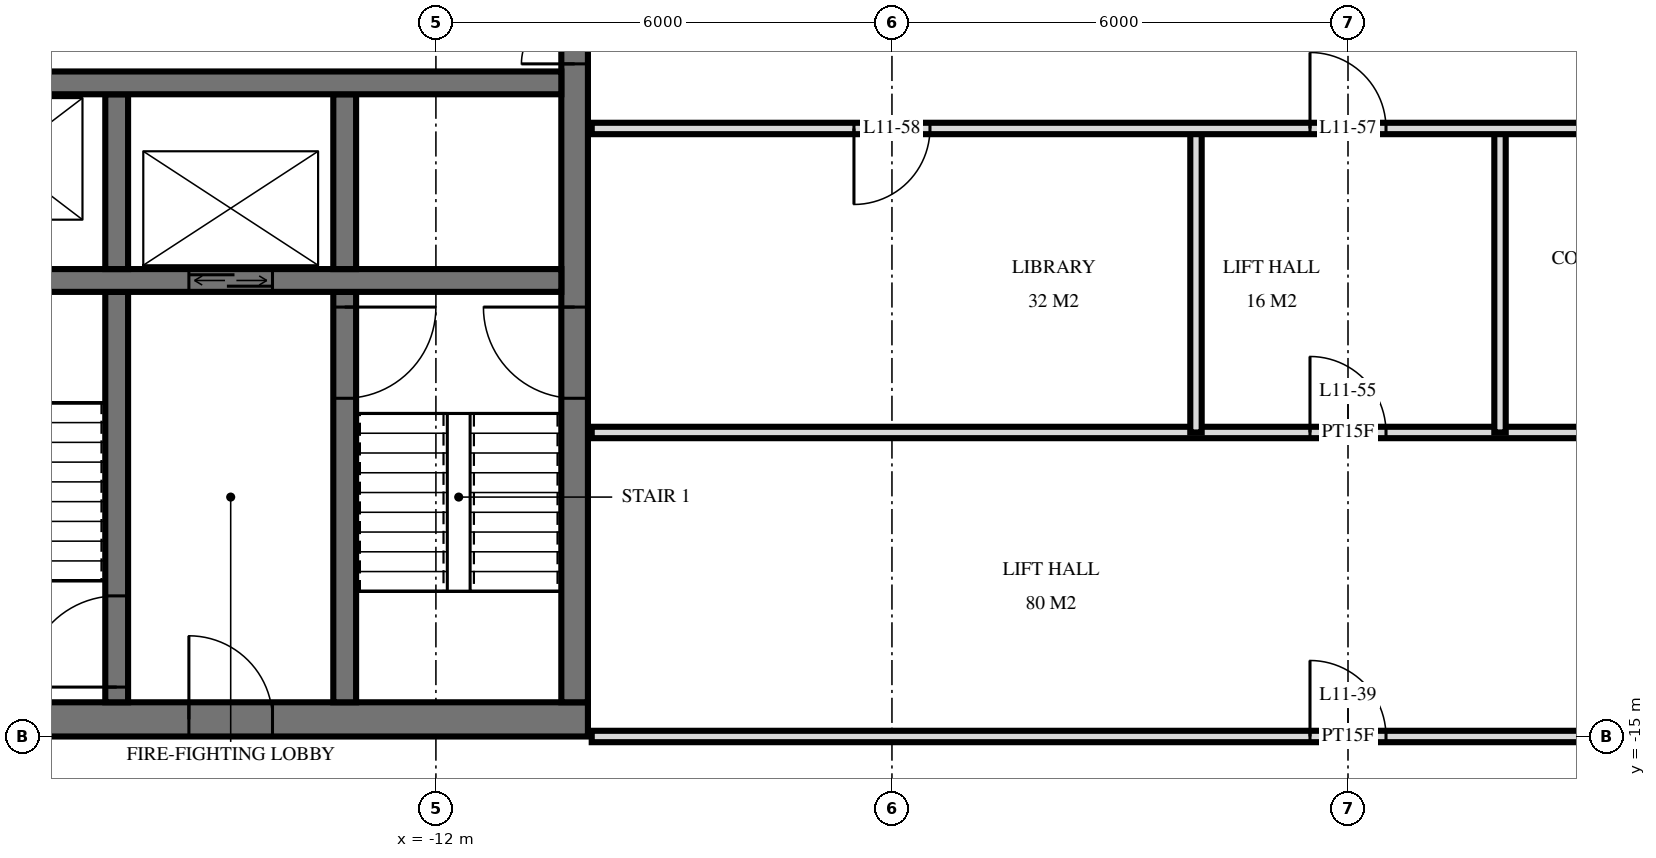
"""IFC4 building model, lengths in metres.
Left out: names, types, materials, properties, quantities, classifications, styles, units other than length and angle.
Written with IfcOpenShell. Run it as: python <this file> out.ifc"""

import sys

from ifc_helpers import new_model, si_unit, direction, frame, frame_2d, origin, place, context, subcontext, project, spatial, rectangle, extrude, element, fill, save


model = new_model("IFC4")
c1 = context("Model", 3, precision=1e-05, world=origin(), true_north=direction((0.0, 1.0)))
c2 = subcontext(c1, "Body", "Model", "MODEL_VIEW")
j1 = project(units=[si_unit("LENGTHUNIT", "METRE"), si_unit("PLANEANGLEUNIT", "RADIAN")], contexts=[c1])
p1 = place(None, origin())
s1 = spatial("IfcSite", under=j1, at=p1, CompositionType="ELEMENT")
p2 = place(p1, origin())
s2 = spatial("IfcBuilding", under=s1, at=p2, CompositionType="ELEMENT")
p3 = place(p2, frame((0.0, 0.0, 49.2)))
s3 = spatial("IfcBuildingStorey", under=s2, at=p3, CompositionType="ELEMENT", Elevation=49.2)
p4 = place(p3, frame((-29.5, -14.775, 0.0), z_axis=(0.0, 0.0, 1.0), x_axis=(1.0, 0.0, 0.0)))
e1 = element("IfcWall", 1, at=p4, inside=s3, PredefinedType="SHEAR", context=c2, shape_type="SweptSolid", body=[
    extrude(rectangle(XDim=19.5, YDim=0.45, at=frame_2d((9.75, 0.0))), origin(), (0.0, 0.0, 1.0), 3.6),
])
p5 = place(p4, frame((11.2, 0.0, 0.0)))
e2 = element("IfcOpeningElement", 2, at=p5, cuts=e1, PredefinedType="OPENING", context=c2, shape_type="SweptSolid", body=[
    extrude(rectangle(XDim=1.2, YDim=2.1, at=frame_2d((0.6, 1.05))), frame((0.0, 0.235, 0.0), z_axis=(0.0, -1.0, 0.0), x_axis=(1.0, 0.0, 0.0)), (0.0, 0.0, 1.0), 0.47),
])
p6 = place(p4, frame((14.25, 0.0, 0.0)))
e3 = element("IfcOpeningElement", 3, at=p6, cuts=e1, PredefinedType="OPENING", context=c2, shape_type="SweptSolid", body=[
    extrude(rectangle(XDim=1.1, YDim=2.1, at=frame_2d((0.55, 1.05))), frame((0.0, 0.235, 0.0), z_axis=(0.0, -1.0, 0.0), x_axis=(1.0, 0.0, 0.0)), (0.0, 0.0, 1.0), 0.47),
])
p7 = place(p4, frame((8.5, 0.0, 0.0)))
e4 = element("IfcOpeningElement", 4, at=p7, cuts=e1, PredefinedType="OPENING", context=c2, shape_type="SweptSolid", body=[
    extrude(rectangle(XDim=0.9, YDim=2.1, at=frame_2d((0.45, 1.05))), frame((0.0, 0.235, 0.0), z_axis=(0.0, -1.0, 0.0), x_axis=(1.0, 0.0, 0.0)), (0.0, 0.0, 1.0), 0.47),
])
p8 = place(p4, frame((6.05, 0.0, 0.0)))
e5 = element("IfcOpeningElement", 5, at=p8, cuts=e1, PredefinedType="OPENING", context=c2, shape_type="SweptSolid", body=[
    extrude(rectangle(XDim=1.0, YDim=2.1, at=frame_2d((0.5, 1.05))), frame((0.0, 0.235, 0.0), z_axis=(0.0, -1.0, 0.0), x_axis=(1.0, 0.0, 0.0)), (0.0, 0.0, 1.0), 0.47),
])
p9 = place(p4, frame((3.587, 0.0, 0.0)))
e6 = element("IfcOpeningElement", 6, at=p9, cuts=e1, PredefinedType="OPENING", context=c2, shape_type="SweptSolid", body=[
    extrude(rectangle(XDim=1.0, YDim=2.1, at=frame_2d((0.5, 1.05))), frame((0.0, 0.235, 0.0), z_axis=(0.0, -1.0, 0.0), x_axis=(1.0, 0.0, 0.0)), (0.0, 0.0, 1.0), 0.47),
])
p10 = place(p4, frame((1.85, 0.0, 0.0)))
e7 = element("IfcOpeningElement", 7, at=p10, cuts=e1, PredefinedType="OPENING", context=c2, shape_type="SweptSolid", body=[
    extrude(rectangle(XDim=1.0, YDim=2.1, at=frame_2d((0.5, 1.05))), frame((0.0, 0.235, 0.0), z_axis=(0.0, -1.0, 0.0), x_axis=(1.0, 0.0, 0.0)), (0.0, 0.0, 1.0), 0.47),
])
p11 = place(p4, frame((0.55, 0.0, 0.0)))
e8 = element("IfcOpeningElement", 8, at=p11, cuts=e1, PredefinedType="OPENING", context=c2, shape_type="SweptSolid", body=[
    extrude(rectangle(XDim=1.0, YDim=2.1, at=frame_2d((0.5, 1.05))), frame((0.0, 0.235, 0.0), z_axis=(0.0, -1.0, 0.0), x_axis=(1.0, 0.0, 0.0)), (0.0, 0.0, 1.0), 0.47),
])
p12 = place(p3, frame((-10.175, -14.55, 0.0), z_axis=(0.0, 0.0, 1.0), x_axis=(0.0, 1.0, 0.0)))
e9 = element("IfcWall", 9, at=p12, inside=s3, PredefinedType="SHEAR", context=c2, shape_type="SweptSolid", body=[
    extrude(rectangle(XDim=14.1, YDim=0.35, at=frame_2d((7.05, 0.0))), origin(), (0.0, 0.0, 1.0), 3.6),
])
p13 = place(p12, frame((8.4, 0.0, 0.0)))
e10 = element("IfcOpeningElement", 10, at=p13, cuts=e9, PredefinedType="OPENING", context=c2, shape_type="SweptSolid", body=[
    extrude(rectangle(XDim=1.4, YDim=2.4, at=frame_2d((0.7, 1.2))), frame((0.0, 0.185, 0.0), z_axis=(0.0, -1.0, 0.0), x_axis=(1.0, 0.0, 0.0)), (0.0, 0.0, 1.0), 0.37),
])
p14 = place(p12, frame((10.0, 0.0, 0.0)))
e11 = element("IfcOpeningElement", 11, at=p14, cuts=e9, PredefinedType="OPENING", context=c2, shape_type="SweptSolid", body=[
    extrude(rectangle(XDim=1.4, YDim=2.4, at=frame_2d((0.7, 1.2))), frame((0.0, 0.185, 0.0), z_axis=(0.0, -1.0, 0.0), x_axis=(1.0, 0.0, 0.0)), (0.0, 0.0, 1.0), 0.37),
])
p15 = place(p12, frame((4.0, 0.0, 0.0)))
e12 = element("IfcOpeningElement", 12, at=p15, cuts=e9, PredefinedType="OPENING", context=c2, shape_type="SweptSolid", body=[
    extrude(rectangle(XDim=1.2, YDim=2.1, at=frame_2d((0.6, 1.05))), frame((0.0, 0.185, 0.0), z_axis=(0.0, -1.0, 0.0), x_axis=(1.0, 0.0, 0.0)), (0.0, 0.0, 1.0), 0.37),
])
p16 = place(p3, frame((-29.05, -6.4, 0.0), z_axis=(0.0, 0.0, 1.0), x_axis=(1.0, 0.0, 0.0)))
e13 = element("IfcWall", 13, at=p16, inside=s3, PredefinedType="SHEAR", context=c2, shape_type="SweptSolid", body=[
    extrude(rectangle(XDim=18.7, YDim=0.3, at=frame_2d((9.35, 0.0))), origin(), (0.0, 0.0, 1.0), 3.6),
])
p17 = place(p16, frame((2.95, 0.0, 0.0)))
e14 = element("IfcOpeningElement", 14, at=p17, cuts=e13, PredefinedType="OPENING", context=c2, shape_type="SweptSolid", body=[
    extrude(rectangle(XDim=1.1, YDim=2.1, at=frame_2d((0.55, 1.05))), frame((0.0, 0.16, 0.0), z_axis=(0.0, -1.0, 0.0), x_axis=(1.0, 0.0, 0.0)), (0.0, 0.0, 1.0), 0.32),
])
p18 = place(p16, frame((0.55, 0.0, 0.0)))
e15 = element("IfcOpeningElement", 15, at=p18, cuts=e13, PredefinedType="OPENING", context=c2, shape_type="SweptSolid", body=[
    extrude(rectangle(XDim=1.1, YDim=2.1, at=frame_2d((0.55, 1.05))), frame((0.0, 0.16, 0.0), z_axis=(0.0, -1.0, 0.0), x_axis=(1.0, 0.0, 0.0)), (0.0, 0.0, 1.0), 0.32),
])
p19 = place(p16, frame((10.8, 0.0, 0.0)))
e16 = element("IfcOpeningElement", 16, at=p19, cuts=e13, PredefinedType="OPENING", context=c2, shape_type="SweptSolid", body=[
    extrude(rectangle(XDim=1.1, YDim=2.1, at=frame_2d((0.55, 1.05))), frame((0.0, 0.16, 0.0), z_axis=(0.0, -1.0, 0.0), x_axis=(1.0, 0.0, 0.0)), (0.0, 0.0, 1.0), 0.32),
])
p20 = place(p16, frame((5.6, 0.0, 0.0)))
e17 = element("IfcOpeningElement", 17, at=p20, cuts=e13, PredefinedType="OPENING", context=c2, shape_type="SweptSolid", body=[
    extrude(rectangle(XDim=1.0, YDim=2.1, at=frame_2d((0.5, 1.05))), frame((0.0, 0.16, 0.0), z_axis=(0.0, -1.0, 0.0), x_axis=(1.0, 0.0, 0.0)), (0.0, 0.0, 1.0), 0.32),
])
p21 = place(p3, frame((-29.05, -9.0, 0.0), z_axis=(0.0, 0.0, 1.0), x_axis=(1.0, 0.0, 0.0)))
e18 = element("IfcWall", 18, at=p21, inside=s3, PredefinedType="SHEAR", context=c2, shape_type="SweptSolid", body=[
    extrude(rectangle(XDim=18.7, YDim=0.3, at=frame_2d((9.35, 0.0))), origin(), (0.0, 0.0, 1.0), 3.6),
])
p22 = place(p21, frame((13.8, 0.0, 0.0)))
e19 = element("IfcOpeningElement", 19, at=p22, cuts=e18, PredefinedType="OPENING", context=c2, shape_type="SweptSolid", body=[
    extrude(rectangle(XDim=1.1, YDim=2.1, at=frame_2d((0.55, 1.05))), frame((0.0, 0.16, 0.0), z_axis=(0.0, -1.0, 0.0), x_axis=(1.0, 0.0, 0.0)), (0.0, 0.0, 1.0), 0.32),
])
p23 = place(p3, frame((-13.2, -8.85, 0.0), z_axis=(0.0, 0.0, 1.0), x_axis=(0.0, 1.0, 0.0)))
e20 = element("IfcWall", 20, at=p23, inside=s3, PredefinedType="SHEAR", context=c2, shape_type="SweptSolid", body=[
    extrude(rectangle(XDim=2.3, YDim=0.3, at=frame_2d((1.15, 0.0))), origin(), (0.0, 0.0, 1.0), 3.6),
])
p24 = place(p3, frame((-13.2, -14.55, 0.0), z_axis=(0.0, 0.0, 1.0), x_axis=(0.0, 1.0, 0.0)))
e21 = element("IfcWall", 21, at=p24, inside=s3, PredefinedType="SHEAR", context=c2, shape_type="SweptSolid", body=[
    extrude(rectangle(XDim=5.4, YDim=0.3, at=frame_2d((2.7, 0.0))), origin(), (0.0, 0.0, 1.0), 3.6),
])
p25 = place(p24, frame((4.0, 0.0, 0.0)))
e22 = element("IfcOpeningElement", 22, at=p25, cuts=e21, PredefinedType="OPENING", context=c2, shape_type="SweptSolid", body=[
    extrude(rectangle(XDim=1.2, YDim=2.1, at=frame_2d((0.6, 1.05))), frame((0.0, 0.16, 0.0), z_axis=(0.0, -1.0, 0.0), x_axis=(1.0, 0.0, 0.0)), (0.0, 0.0, 1.0), 0.32),
])
p26 = place(p3, frame((-16.2, -8.85, 0.0), z_axis=(0.0, 0.0, 1.0), x_axis=(0.0, 1.0, 0.0)))
e23 = element("IfcWall", 23, at=p26, inside=s3, PredefinedType="SHEAR", context=c2, shape_type="SweptSolid", body=[
    extrude(rectangle(XDim=2.3, YDim=0.3, at=frame_2d((1.15, 0.0))), origin(), (0.0, 0.0, 1.0), 3.6),
])
p27 = place(p3, frame((-16.2, -14.55, 0.0), z_axis=(0.0, 0.0, 1.0), x_axis=(0.0, 1.0, 0.0)))
e24 = element("IfcWall", 24, at=p27, inside=s3, PredefinedType="SHEAR", context=c2, shape_type="SweptSolid", body=[
    extrude(rectangle(XDim=5.4, YDim=0.3, at=frame_2d((2.7, 0.0))), origin(), (0.0, 0.0, 1.0), 3.6),
])
p28 = place(p27, frame((0.2, 0.0, 0.0)))
e25 = element("IfcOpeningElement", 25, at=p28, cuts=e24, PredefinedType="OPENING", context=c2, shape_type="SweptSolid", body=[
    extrude(rectangle(XDim=1.2, YDim=2.1, at=frame_2d((0.6, 1.05))), frame((0.0, 0.16, 0.0), z_axis=(0.0, -1.0, 0.0), x_axis=(1.0, 0.0, 0.0)), (0.0, 0.0, 1.0), 0.32),
])
for number, where, z_axis, x_axis in (
    (26, (2.0, -11.0, 0.0), (0.0, 0.0, 1.0), (0.0, 1.0, 0.0)),
    (27, (-2.0, -11.0, 0.0), (0.0, 0.0, 1.0), (0.0, 1.0, 0.0)),
):
    element("IfcWall", number, at=place(p3, frame(where, z_axis=z_axis, x_axis=x_axis)), inside=s3, PredefinedType="PARTITIONING", context=c2, shape_type="SweptSolid", body=[
        extrude(rectangle(XDim=4.0, YDim=0.15, at=frame_2d((2.0, 0.0))), origin(), (0.0, 0.0, 1.0), 3.32),
    ])
p29 = place(p3, frame((-9.95, -15.0, 0.0), z_axis=(0.0, 0.0, 1.0), x_axis=(1.0, 0.0, 0.0)))
e28 = element("IfcWall", 28, at=p29, inside=s3, PredefinedType="PARTITIONING", context=c2, shape_type="SweptSolid", body=[
    extrude(rectangle(XDim=19.9, YDim=0.15, at=frame_2d((9.95, 0.0))), origin(), (0.0, 0.0, 1.0), 2.684),
])
p30 = place(p29, frame((9.45, 0.0, 0.0)))
e29 = element("IfcOpeningElement", 29, at=p30, cuts=e28, PredefinedType="OPENING", context=c2, shape_type="SweptSolid", body=[
    extrude(rectangle(XDim=1.0, YDim=2.1, at=frame_2d((0.5, 1.05))), frame((0.0, 0.085, 0.0), z_axis=(0.0, -1.0, 0.0), x_axis=(1.0, 0.0, 0.0)), (0.0, 0.0, 1.0), 0.17),
])
p31 = place(p3, frame((-9.95, -11.0, 0.0), z_axis=(0.0, 0.0, 1.0), x_axis=(1.0, 0.0, 0.0)))
e30 = element("IfcWall", 30, at=p31, inside=s3, PredefinedType="PARTITIONING", context=c2, shape_type="SweptSolid", body=[
    extrude(rectangle(XDim=19.9, YDim=0.15, at=frame_2d((9.95, 0.0))), origin(), (0.0, 0.0, 1.0), 3.32),
])
p32 = place(p31, frame((9.45, 0.0, 0.0)))
e31 = element("IfcOpeningElement", 31, at=p32, cuts=e30, PredefinedType="OPENING", context=c2, shape_type="SweptSolid", body=[
    extrude(rectangle(XDim=1.0, YDim=2.1, at=frame_2d((0.5, 1.05))), frame((0.0, 0.085, 0.0), z_axis=(0.0, -1.0, 0.0), x_axis=(1.0, 0.0, 0.0)), (0.0, 0.0, 1.0), 0.17),
])
p33 = place(p31, frame((15.45, 0.0, 0.0)))
e32 = element("IfcOpeningElement", 32, at=p33, cuts=e30, PredefinedType="OPENING", context=c2, shape_type="SweptSolid", body=[
    extrude(rectangle(XDim=1.0, YDim=2.1, at=frame_2d((0.5, 1.05))), frame((0.0, 0.085, 0.0), z_axis=(0.0, -1.0, 0.0), x_axis=(1.0, 0.0, 0.0)), (0.0, 0.0, 1.0), 0.17),
])
p34 = place(p3, frame((-9.95, -7.0, 0.0), z_axis=(0.0, 0.0, 1.0), x_axis=(1.0, 0.0, 0.0)))
e33 = element("IfcWall", 33, at=p34, inside=s3, PredefinedType="PARTITIONING", context=c2, shape_type="SweptSolid", body=[
    extrude(rectangle(XDim=19.9, YDim=0.15, at=frame_2d((9.95, 0.0))), origin(), (0.0, 0.0, 1.0), 3.32),
])
p35 = place(p34, frame((9.45, 0.0, 0.0)))
e34 = element("IfcOpeningElement", 34, at=p35, cuts=e33, PredefinedType="OPENING", context=c2, shape_type="SweptSolid", body=[
    extrude(rectangle(XDim=1.0, YDim=2.1, at=frame_2d((0.5, 1.05))), frame((0.0, 0.085, 0.0), z_axis=(0.0, -1.0, 0.0), x_axis=(1.0, 0.0, 0.0)), (0.0, 0.0, 1.0), 0.17),
])
p36 = place(p34, frame((3.45, 0.0, 0.0)))
e35 = element("IfcOpeningElement", 35, at=p36, cuts=e33, PredefinedType="OPENING", context=c2, shape_type="SweptSolid", body=[
    extrude(rectangle(XDim=1.0, YDim=2.1, at=frame_2d((0.5, 1.05))), frame((0.0, 0.085, 0.0), z_axis=(0.0, -1.0, 0.0), x_axis=(1.0, 0.0, 0.0)), (0.0, 0.0, 1.0), 0.17),
])
p37 = place(p22, origin())
e36 = element("IfcDoor", 36, at=p37, inside=s3, OperationType="DOUBLE_DOOR_SLIDING", PredefinedType="USERDEFINED", context=c2, shape_type="SweptSolid", body=[
    extrude(rectangle(XDim=1.1, YDim=2.1, at=frame_2d((0.55, 1.05))), frame((0.0, 0.025, 0.0), z_axis=(0.0, -1.0, 0.0), x_axis=(1.0, 0.0, 0.0)), (0.0, 0.0, 1.0), 0.05),
])
fill(e19, e36)
p38 = place(p13, origin())
e37 = element("IfcDoor", 37, at=p38, inside=s3, OperationType="DOUBLE_DOOR_SINGLE_SWING", PredefinedType="DOOR", context=c2, shape_type="SweptSolid", body=[
    extrude(rectangle(XDim=1.4, YDim=2.4, at=frame_2d((0.7, 1.2))), frame((0.0, 0.025, 0.0), z_axis=(0.0, -1.0, 0.0), x_axis=(1.0, 0.0, 0.0)), (0.0, 0.0, 1.0), 0.05),
])
fill(e10, e37)
p39 = place(p15, origin())
e38 = element("IfcDoor", 38, at=p39, inside=s3, OperationType="SINGLE_SWING_LEFT", PredefinedType="DOOR", context=c2, shape_type="SweptSolid", body=[
    extrude(rectangle(XDim=1.2, YDim=2.1, at=frame_2d((0.6, 1.05))), frame((0.0, 0.025, 0.0), z_axis=(0.0, -1.0, 0.0), x_axis=(1.0, 0.0, 0.0)), (0.0, 0.0, 1.0), 0.05),
])
fill(e12, e38)
p40 = place(p6, origin())
e39 = element("IfcDoor", 39, at=p40, inside=s3, OperationType="SINGLE_SWING_RIGHT", PredefinedType="DOOR", context=c2, shape_type="SweptSolid", body=[
    extrude(rectangle(XDim=1.1, YDim=2.1, at=frame_2d((0.55, 1.05))), frame((0.0, 0.025, 0.0), z_axis=(0.0, -1.0, 0.0), x_axis=(1.0, 0.0, 0.0)), (0.0, 0.0, 1.0), 0.05),
])
fill(e3, e39)
p41 = place(p25, frame((0.6, 0.0, 0.0), z_axis=(0.0, 0.0, 1.0), x_axis=(-1.0, 0.0, 0.0)))
e40 = element("IfcDoor", 40, at=p41, inside=s3, OperationType="SINGLE_SWING_RIGHT", PredefinedType="DOOR", context=c2, shape_type="SweptSolid", body=[
    extrude(rectangle(XDim=1.2, YDim=2.1, at=frame_2d((0.0, 1.05))), frame((0.0, -0.025, 0.0), z_axis=(0.0, 1.0, 0.0), x_axis=(-1.0, 0.0, 0.0)), (0.0, 0.0, 1.0), 0.05),
])
fill(e22, e40)
p42 = place(p28, origin())
e41 = element("IfcDoor", 41, at=p42, inside=s3, OperationType="SINGLE_SWING_RIGHT", PredefinedType="DOOR", context=c2, shape_type="SweptSolid", body=[
    extrude(rectangle(XDim=1.2, YDim=2.1, at=frame_2d((0.6, 1.05))), frame((0.0, 0.025, 0.0), z_axis=(0.0, -1.0, 0.0), x_axis=(1.0, 0.0, 0.0)), (0.0, 0.0, 1.0), 0.05),
])
fill(e25, e41)
p43 = place(p30, origin())
e42 = element("IfcDoor", 42, at=p43, inside=s3, OperationType="SINGLE_SWING_RIGHT", PredefinedType="DOOR", context=c2, shape_type="SweptSolid", body=[
    extrude(rectangle(XDim=1.0, YDim=2.1, at=frame_2d((0.5, 1.05))), frame((0.0, 0.025, 0.0), z_axis=(0.0, -1.0, 0.0), x_axis=(1.0, 0.0, 0.0)), (0.0, 0.0, 1.0), 0.05),
])
fill(e29, e42)
p44 = place(p32, origin())
e43 = element("IfcDoor", 43, at=p44, inside=s3, OperationType="SINGLE_SWING_RIGHT", PredefinedType="DOOR", context=c2, shape_type="SweptSolid", body=[
    extrude(rectangle(XDim=1.0, YDim=2.1, at=frame_2d((0.5, 1.05))), frame((0.0, 0.025, 0.0), z_axis=(0.0, -1.0, 0.0), x_axis=(1.0, 0.0, 0.0)), (0.0, 0.0, 1.0), 0.05),
])
fill(e31, e43)
p45 = place(p35, origin())
e44 = element("IfcDoor", 44, at=p45, inside=s3, OperationType="SINGLE_SWING_RIGHT", PredefinedType="DOOR", context=c2, shape_type="SweptSolid", body=[
    extrude(rectangle(XDim=1.0, YDim=2.1, at=frame_2d((0.5, 1.05))), frame((0.0, 0.025, 0.0), z_axis=(0.0, -1.0, 0.0), x_axis=(1.0, 0.0, 0.0)), (0.0, 0.0, 1.0), 0.05),
])
fill(e34, e44)
p46 = place(p36, frame((0.5, 0.0, 0.0), z_axis=(0.0, 0.0, 1.0), x_axis=(-1.0, 0.0, 0.0)))
e45 = element("IfcDoor", 45, at=p46, inside=s3, OperationType="SINGLE_SWING_LEFT", PredefinedType="DOOR", context=c2, shape_type="SweptSolid", body=[
    extrude(rectangle(XDim=1.0, YDim=2.1, at=frame_2d((0.0, 1.05))), frame((0.0, -0.025, 0.0), z_axis=(0.0, 1.0, 0.0), x_axis=(-1.0, 0.0, 0.0)), (0.0, 0.0, 1.0), 0.05),
])
fill(e35, e45)
save(model, sys.argv[1])
